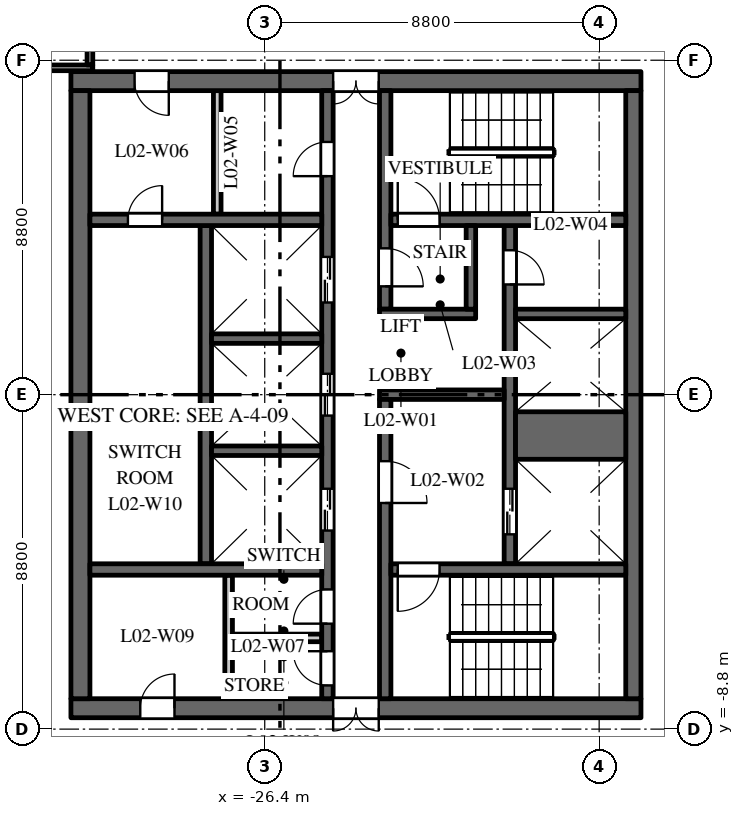
"""IFC4 building model, lengths in metres.
Left out: names, types, materials, properties, quantities, classifications, styles, units other than length and angle.
Written with IfcOpenShell. Run it as: python <this file> out.ifc"""

import sys

from ifc_helpers import new_model, si_unit, direction, frame, frame_2d, origin, place, context, subcontext, project, spatial, rectangle, extrude, element, fill, save


model = new_model("IFC4")
c1 = context("Model", 3, precision=1e-05, world=origin(), true_north=direction((0.0, 1.0)))
c2 = subcontext(c1, "Body", "Model", "MODEL_VIEW")
j1 = project(units=[si_unit("LENGTHUNIT", "METRE"), si_unit("PLANEANGLEUNIT", "RADIAN")], contexts=[c1])
p1 = place(None, origin())
s1 = spatial("IfcSite", under=j1, at=p1, CompositionType="ELEMENT")
p2 = place(p1, origin())
s2 = spatial("IfcBuilding", under=s1, at=p2, CompositionType="ELEMENT")
p3 = place(p2, frame((0.0, 0.0, 13.5)))
s3 = spatial("IfcBuildingStorey", under=s2, at=p3, CompositionType="ELEMENT", Elevation=13.5)
p4 = place(p3, frame((-16.5, 8.25, 0.0), z_axis=(0.0, 0.0, 1.0), x_axis=(-1.0, 0.0, 0.0)))
e1 = element("IfcWall", 1, at=p4, inside=s3, PredefinedType="SHEAR", context=c2, shape_type="SweptSolid", body=[
    extrude(rectangle(XDim=15.0, YDim=0.5, at=frame_2d((7.5, 0.0))), origin(), (0.0, 0.0, 1.0), 5.75),
])
p5 = place(p4, frame((6.9, 0.0, 0.0)))
e2 = element("IfcOpeningElement", 2, at=p5, cuts=e1, PredefinedType="OPENING", context=c2, shape_type="SweptSolid", body=[
    extrude(rectangle(XDim=1.2, YDim=2.1, at=frame_2d((0.6, 1.05))), frame((0.0, 0.26, 0.0), z_axis=(0.0, -1.0, 0.0), x_axis=(1.0, 0.0, 0.0)), (0.0, 0.0, 1.0), 0.52),
])
p6 = place(p4, frame((12.425, 0.0, 0.0)))
e3 = element("IfcOpeningElement", 3, at=p6, cuts=e1, PredefinedType="OPENING", context=c2, shape_type="SweptSolid", body=[
    extrude(rectangle(XDim=0.9, YDim=2.1, at=frame_2d((0.45, 1.05))), frame((0.0, 0.26, 0.0), z_axis=(0.0, -1.0, 0.0), x_axis=(1.0, 0.0, 0.0)), (0.0, 0.0, 1.0), 0.52),
])
p7 = place(p3, frame((-16.5, -8.25, 0.0), z_axis=(0.0, 0.0, 1.0), x_axis=(-1.0, 0.0, 0.0)))
e4 = element("IfcWall", 4, at=p7, inside=s3, PredefinedType="SHEAR", context=c2, shape_type="SweptSolid", body=[
    extrude(rectangle(XDim=15.0, YDim=0.5, at=frame_2d((7.5, 0.0))), origin(), (0.0, 0.0, 1.0), 5.75),
])
p8 = place(p7, frame((6.9, 0.0, 0.0)))
e5 = element("IfcOpeningElement", 5, at=p8, cuts=e4, PredefinedType="OPENING", context=c2, shape_type="SweptSolid", body=[
    extrude(rectangle(XDim=1.2, YDim=2.1, at=frame_2d((0.6, 1.05))), frame((0.0, 0.26, 0.0), z_axis=(0.0, -1.0, 0.0), x_axis=(1.0, 0.0, 0.0)), (0.0, 0.0, 1.0), 0.52),
])
p9 = place(p7, frame((12.275, 0.0, 0.0)))
e6 = element("IfcOpeningElement", 6, at=p9, cuts=e4, PredefinedType="OPENING", context=c2, shape_type="SweptSolid", body=[
    extrude(rectangle(XDim=0.9, YDim=2.1, at=frame_2d((0.45, 1.05))), frame((0.0, 0.26, 0.0), z_axis=(0.0, -1.0, 0.0), x_axis=(1.0, 0.0, 0.0)), (0.0, 0.0, 1.0), 0.52),
])
p10 = place(p3, frame((-27.95, -4.45, 0.0), z_axis=(0.0, 0.0, 1.0), x_axis=(0.0, 1.0, 0.0)))
e7 = element("IfcWall", 7, at=p10, inside=s3, PredefinedType="SHEAR", context=c2, shape_type="SweptSolid", body=[
    extrude(rectangle(XDim=8.9, YDim=0.3, at=frame_2d((4.45, 0.0))), origin(), (0.0, 0.0, 1.0), 5.75),
])
p11 = place(p3, frame((-19.95, -4.45, 0.0), z_axis=(0.0, 0.0, 1.0), x_axis=(0.0, 1.0, 0.0)))
e8 = element("IfcWall", 8, at=p11, inside=s3, PredefinedType="SHEAR", context=c2, shape_type="SweptSolid", body=[
    extrude(rectangle(XDim=8.9, YDim=0.3, at=frame_2d((4.45, 0.0))), origin(), (0.0, 0.0, 1.0), 5.75),
])
p12 = place(p11, frame((0.775, 0.0, 0.0)))
e9 = element("IfcOpeningElement", 9, at=p12, cuts=e8, PredefinedType="OPENING", context=c2, shape_type="SweptSolid", body=[
    extrude(rectangle(XDim=1.2, YDim=2.1, at=frame_2d((0.6, 1.05))), frame((0.0, 0.16, 0.0), z_axis=(0.0, -1.0, 0.0), x_axis=(1.0, 0.0, 0.0)), (0.0, 0.0, 1.0), 0.32),
])
p13 = place(p11, frame((7.35, 0.0, 0.0)))
e10 = element("IfcOpeningElement", 10, at=p13, cuts=e8, PredefinedType="OPENING", context=c2, shape_type="SweptSolid", body=[
    extrude(rectangle(XDim=0.9, YDim=2.1, at=frame_2d((0.45, 1.05))), frame((0.0, 0.16, 0.0), z_axis=(0.0, -1.0, 0.0), x_axis=(1.0, 0.0, 0.0)), (0.0, 0.0, 1.0), 0.32),
])
p14 = place(p3, frame((-24.75, -8.0, 0.0), z_axis=(0.0, 0.0, 1.0), x_axis=(0.0, 1.0, 0.0)))
e11 = element("IfcWall", 11, at=p14, inside=s3, PredefinedType="SHEAR", context=c2, shape_type="SweptSolid", body=[
    extrude(rectangle(XDim=16.0, YDim=0.3, at=frame_2d((8.0, 0.0))), origin(), (0.0, 0.0, 1.0), 5.75),
])
p15 = place(p14, frame((4.425, 0.0, 0.0)))
e12 = element("IfcOpeningElement", 12, at=p15, cuts=e11, PredefinedType="OPENING", context=c2, shape_type="SweptSolid", body=[
    extrude(rectangle(XDim=1.1, YDim=2.1, at=frame_2d((0.55, 1.05))), frame((0.0, 0.16, 0.0), z_axis=(0.0, -1.0, 0.0), x_axis=(1.0, 0.0, 0.0)), (0.0, 0.0, 1.0), 0.32),
])
p16 = place(p14, frame((7.45, 0.0, 0.0)))
e13 = element("IfcOpeningElement", 13, at=p16, cuts=e11, PredefinedType="OPENING", context=c2, shape_type="SweptSolid", body=[
    extrude(rectangle(XDim=1.1, YDim=2.1, at=frame_2d((0.55, 1.05))), frame((0.0, 0.16, 0.0), z_axis=(0.0, -1.0, 0.0), x_axis=(1.0, 0.0, 0.0)), (0.0, 0.0, 1.0), 0.32),
])
p17 = place(p14, frame((10.425, 0.0, 0.0)))
e14 = element("IfcOpeningElement", 14, at=p17, cuts=e11, PredefinedType="OPENING", context=c2, shape_type="SweptSolid", body=[
    extrude(rectangle(XDim=1.2, YDim=2.1, at=frame_2d((0.6, 1.05))), frame((0.0, 0.16, 0.0), z_axis=(0.0, -1.0, 0.0), x_axis=(1.0, 0.0, 0.0)), (0.0, 0.0, 1.0), 0.32),
])
p18 = place(p14, frame((13.75, 0.0, 0.0)))
e15 = element("IfcOpeningElement", 15, at=p18, cuts=e11, PredefinedType="OPENING", context=c2, shape_type="SweptSolid", body=[
    extrude(rectangle(XDim=0.9, YDim=2.1, at=frame_2d((0.45, 1.05))), frame((0.0, 0.16, 0.0), z_axis=(0.0, -1.0, 0.0), x_axis=(1.0, 0.0, 0.0)), (0.0, 0.0, 1.0), 0.32),
])
p19 = place(p14, frame((1.975, 0.0, 0.0)))
e16 = element("IfcOpeningElement", 16, at=p19, cuts=e11, PredefinedType="OPENING", context=c2, shape_type="SweptSolid", body=[
    extrude(rectangle(XDim=0.9, YDim=2.1, at=frame_2d((0.45, 1.05))), frame((0.0, 0.16, 0.0), z_axis=(0.0, -1.0, 0.0), x_axis=(1.0, 0.0, 0.0)), (0.0, 0.0, 1.0), 0.32),
])
p20 = place(p14, frame((0.35, 0.0, 0.0)))
e17 = element("IfcOpeningElement", 17, at=p20, cuts=e11, PredefinedType="OPENING", context=c2, shape_type="SweptSolid", body=[
    extrude(rectangle(XDim=0.9, YDim=2.1, at=frame_2d((0.45, 1.05))), frame((0.0, 0.16, 0.0), z_axis=(0.0, -1.0, 0.0), x_axis=(1.0, 0.0, 0.0)), (0.0, 0.0, 1.0), 0.32),
])
p21 = place(p3, frame((-20.1, 0.0, 0.0), z_axis=(0.0, 0.0, 1.0), x_axis=(-1.0, 0.0, 0.0)))
e18 = element("IfcWall", 18, at=p21, inside=s3, PredefinedType="SHEAR", context=c2, shape_type="SweptSolid", body=[
    extrude(rectangle(XDim=3.28, YDim=0.25, at=frame_2d((1.64, 0.0))), origin(), (0.0, 0.0, 1.0), 5.75),
])
p22 = place(p3, frame((-16.7, -8.0, 0.0), z_axis=(0.0, 0.0, 1.0), x_axis=(0.0, 1.0, 0.0)))
e19 = element("IfcWall", 19, at=p22, inside=s3, PredefinedType="SHEAR", context=c2, shape_type="SweptSolid", body=[
    extrude(rectangle(XDim=16.0, YDim=0.4, at=frame_2d((8.0, 0.0))), origin(), (0.0, 0.0, 1.0), 5.75),
])
p23 = place(p3, frame((-31.25, -8.0, 0.0), z_axis=(0.0, 0.0, 1.0), x_axis=(0.0, 1.0, 0.0)))
e20 = element("IfcWall", 20, at=p23, inside=s3, PredefinedType="SHEAR", context=c2, shape_type="SweptSolid", body=[
    extrude(rectangle(XDim=16.0, YDim=0.5, at=frame_2d((8.0, 0.0))), origin(), (0.0, 0.0, 1.0), 5.75),
])
p24 = place(p3, frame((-24.9, 4.6, 0.0), z_axis=(0.0, 0.0, 1.0), x_axis=(-1.0, 0.0, 0.0)))
e21 = element("IfcWall", 21, at=p24, inside=s3, PredefinedType="SHEAR", context=c2, shape_type="SweptSolid", body=[
    extrude(rectangle(XDim=6.1, YDim=0.3, at=frame_2d((3.05, 0.0))), origin(), (0.0, 0.0, 1.0), 5.75),
])
p25 = place(p24, frame((4.2, 0.0, 0.0)))
e22 = element("IfcOpeningElement", 22, at=p25, cuts=e21, PredefinedType="OPENING", context=c2, shape_type="SweptSolid", body=[
    extrude(rectangle(XDim=0.9, YDim=2.1, at=frame_2d((0.45, 1.05))), frame((0.0, 0.16, 0.0), z_axis=(0.0, -1.0, 0.0), x_axis=(1.0, 0.0, 0.0)), (0.0, 0.0, 1.0), 0.32),
])
for number, where, z_axis, x_axis in (
    (23, (-27.65, 4.75, 0.0), (0.0, 0.0, 1.0), (0.0, 1.0, 0.0)),
    (24, (-27.35, -8.0, 0.0), (0.0, 0.0, 1.0), (0.0, 1.0, 0.0)),
):
    element("IfcWall", number, at=place(p3, frame(where, z_axis=z_axis, x_axis=x_axis)), inside=s3, PredefinedType="PARTITIONING", context=c2, shape_type="SweptSolid", body=[
        extrude(rectangle(XDim=3.25, YDim=0.2, at=frame_2d((1.625, 0.0))), origin(), (0.0, 0.0, 1.0), 5.75),
    ])
p26 = place(p3, frame((-24.9, -6.4, 0.0), z_axis=(0.0, 0.0, 1.0), x_axis=(-1.0, 0.0, 0.0)))
e25 = element("IfcWall", 25, at=p26, inside=s3, PredefinedType="PARTITIONING", context=c2, shape_type="SweptSolid", body=[
    extrude(rectangle(XDim=2.35, YDim=0.2, at=frame_2d((1.175, 0.0))), origin(), (0.0, 0.0, 1.0), 5.75),
])
p27 = place(p3, frame((-24.9, -4.6, 0.0), z_axis=(0.0, 0.0, 1.0), x_axis=(-1.0, 0.0, 0.0)))
e26 = element("IfcWall", 26, at=p27, inside=s3, PredefinedType="SHEAR", context=c2, shape_type="SweptSolid", body=[
    extrude(rectangle(XDim=6.1, YDim=0.3, at=frame_2d((3.05, 0.0))), origin(), (0.0, 0.0, 1.0), 5.75),
])
p28 = place(p3, frame((-16.9, -1.075, 0.0), z_axis=(0.0, 0.0, 1.0), x_axis=(-1.0, 0.0, 0.0)))
e27 = element("IfcWall", 27, at=p28, inside=s3, PredefinedType="SHEAR", context=c2, shape_type="SweptSolid", body=[
    extrude(rectangle(XDim=2.9, YDim=1.25, at=frame_2d((1.45, 0.0))), origin(), (0.0, 0.0, 1.0), 5.75),
])
for number, where, z_axis, x_axis in (
    (28, (-16.9, 2.125, 0.0), (0.0, 0.0, 1.0), (-1.0, 0.0, 0.0)),
    (29, (-24.9, -1.475, 0.0), (0.0, 0.0, 1.0), (-1.0, 0.0, 0.0)),
    (30, (-24.9, 1.475, 0.0), (0.0, 0.0, 1.0), (-1.0, 0.0, 0.0)),
):
    element("IfcWall", number, at=place(p3, frame(where, z_axis=z_axis, x_axis=x_axis)), inside=s3, PredefinedType="SHEAR", context=c2, shape_type="SweptSolid", body=[
        extrude(rectangle(XDim=2.9, YDim=0.25, at=frame_2d((1.45, 0.0))), origin(), (0.0, 0.0, 1.0), 5.75),
    ])
p29 = place(p3, frame((-23.23, 2.25, 0.0), z_axis=(0.0, 0.0, 1.0), x_axis=(0.0, 1.0, 0.0)))
e31 = element("IfcWall", 31, at=p29, inside=s3, PredefinedType="SHEAR", context=c2, shape_type="SweptSolid", body=[
    extrude(rectangle(XDim=5.75, YDim=0.3, at=frame_2d((2.875, 0.0))), origin(), (0.0, 0.0, 1.0), 5.75),
])
p30 = place(p29, frame((0.6, 0.0, 0.0)))
e32 = element("IfcOpeningElement", 32, at=p30, cuts=e31, PredefinedType="OPENING", context=c2, shape_type="SweptSolid", body=[
    extrude(rectangle(XDim=1.0, YDim=2.1, at=frame_2d((0.5, 1.05))), frame((0.0, 0.16, 0.0), z_axis=(0.0, -1.0, 0.0), x_axis=(1.0, 0.0, 0.0)), (0.0, 0.0, 1.0), 0.32),
])
p31 = place(p3, frame((-23.23, -8.0, 0.0), z_axis=(0.0, 0.0, 1.0), x_axis=(0.0, 1.0, 0.0)))
e33 = element("IfcWall", 33, at=p31, inside=s3, PredefinedType="SHEAR", context=c2, shape_type="SweptSolid", body=[
    extrude(rectangle(XDim=7.875, YDim=0.3, at=frame_2d((3.938, 0.0))), origin(), (0.0, 0.0, 1.0), 5.75),
])
p32 = place(p31, frame((5.15, 0.0, 0.0)))
e34 = element("IfcOpeningElement", 34, at=p32, cuts=e33, PredefinedType="OPENING", context=c2, shape_type="SweptSolid", body=[
    extrude(rectangle(XDim=1.1, YDim=2.1, at=frame_2d((0.55, 1.05))), frame((0.0, 0.16, 0.0), z_axis=(0.0, -1.0, 0.0), x_axis=(1.0, 0.0, 0.0)), (0.0, 0.0, 1.0), 0.32),
])
p33 = place(p3, frame((-16.9, 4.6, 0.0), z_axis=(0.0, 0.0, 1.0), x_axis=(-1.0, 0.0, 0.0)))
e35 = element("IfcWall", 35, at=p33, inside=s3, PredefinedType="SHEAR", context=c2, shape_type="SweptSolid", body=[
    extrude(rectangle(XDim=6.18, YDim=0.3, at=frame_2d((3.09, 0.0))), origin(), (0.0, 0.0, 1.0), 5.75),
])
p34 = place(p33, frame((4.9, 0.0, 0.0)))
e36 = element("IfcOpeningElement", 36, at=p34, cuts=e35, PredefinedType="OPENING", context=c2, shape_type="SweptSolid", body=[
    extrude(rectangle(XDim=1.1, YDim=2.1, at=frame_2d((0.55, 1.05))), frame((0.0, 0.16, 0.0), z_axis=(0.0, -1.0, 0.0), x_axis=(1.0, 0.0, 0.0)), (0.0, 0.0, 1.0), 0.32),
])
p35 = place(p3, frame((-16.9, -4.6, 0.0), z_axis=(0.0, 0.0, 1.0), x_axis=(-1.0, 0.0, 0.0)))
e37 = element("IfcWall", 37, at=p35, inside=s3, PredefinedType="SHEAR", context=c2, shape_type="SweptSolid", body=[
    extrude(rectangle(XDim=6.18, YDim=0.3, at=frame_2d((3.09, 0.0))), origin(), (0.0, 0.0, 1.0), 5.75),
])
p36 = place(p35, frame((4.9, 0.0, 0.0)))
e38 = element("IfcOpeningElement", 38, at=p36, cuts=e37, PredefinedType="OPENING", context=c2, shape_type="SweptSolid", body=[
    extrude(rectangle(XDim=1.1, YDim=2.1, at=frame_2d((0.55, 1.05))), frame((0.0, 0.16, 0.0), z_axis=(0.0, -1.0, 0.0), x_axis=(1.0, 0.0, 0.0)), (0.0, 0.0, 1.0), 0.32),
])
p37 = place(p3, frame((-20.85, 2.125, 0.0), z_axis=(0.0, 0.0, 1.0), x_axis=(-1.0, 0.0, 0.0)))
e39 = element("IfcWall", 39, at=p37, inside=s3, PredefinedType="SHEAR", context=c2, shape_type="SweptSolid", body=[
    extrude(rectangle(XDim=2.53, YDim=0.25, at=frame_2d((1.265, 0.0))), origin(), (0.0, 0.0, 1.0), 5.75),
])
p38 = place(p3, frame((-20.975, 2.25, 0.0), z_axis=(0.0, 0.0, 1.0), x_axis=(0.0, 1.0, 0.0)))
e40 = element("IfcWall", 40, at=p38, inside=s3, PredefinedType="SHEAR", context=c2, shape_type="SweptSolid", body=[
    extrude(rectangle(XDim=2.2, YDim=0.25, at=frame_2d((1.1, 0.0))), origin(), (0.0, 0.0, 1.0), 5.75),
])
p39 = place(p3, frame((-30.925, 8.6, 0.0), z_axis=(0.0, 0.0, 1.0), x_axis=(-1.0, 0.0, 0.0)))
e41 = element("IfcWall", 41, at=p39, inside=s3, PredefinedType="PARTITIONING", context=c2, shape_type="SweptSolid", body=[
    extrude(rectangle(XDim=8.025, YDim=0.15, at=frame_2d((4.012, 0.0))), origin(), (0.0, 0.0, 1.0), 4.85),
])
p40 = place(p39, frame((4.012, 0.0, 0.0)))
e42 = element("IfcOpeningElement", 42, at=p40, cuts=e41, PredefinedType="OPENING", context=c2, shape_type="SweptSolid", body=[
    extrude(rectangle(XDim=1.0, YDim=2.1, at=frame_2d((0.5, 1.05))), frame((0.0, 0.085, 0.0), z_axis=(0.0, -1.0, 0.0), x_axis=(1.0, 0.0, 0.0)), (0.0, 0.0, 1.0), 0.17),
])
p41 = place(p3, frame((-31.0, 11.925, 0.0), z_axis=(0.0, 0.0, 1.0), x_axis=(0.0, -1.0, 0.0)))
e43 = element("IfcWall", 43, at=p41, inside=s3, PredefinedType="PARTITIONING", context=c2, shape_type="SweptSolid", body=[
    extrude(rectangle(XDim=3.25, YDim=0.15, at=frame_2d((1.625, 0.0))), origin(), (0.0, 0.0, 1.0), 5.75),
])
p42 = place(p12, origin())
e44 = element("IfcDoor", 44, at=p42, inside=s3, OperationType="DOUBLE_DOOR_SLIDING", PredefinedType="DOOR", context=c2, shape_type="SweptSolid", body=[
    extrude(rectangle(XDim=1.2, YDim=2.1, at=frame_2d((0.6, 1.05))), frame((0.0, 0.025, 0.0), z_axis=(0.0, -1.0, 0.0), x_axis=(1.0, 0.0, 0.0)), (0.0, 0.0, 1.0), 0.05),
])
fill(e9, e44)
p43 = place(p15, origin())
e45 = element("IfcDoor", 45, at=p43, inside=s3, OperationType="DOUBLE_DOOR_SLIDING", PredefinedType="DOOR", context=c2, shape_type="SweptSolid", body=[
    extrude(rectangle(XDim=1.1, YDim=2.1, at=frame_2d((0.55, 1.05))), frame((0.0, 0.025, 0.0), z_axis=(0.0, -1.0, 0.0), x_axis=(1.0, 0.0, 0.0)), (0.0, 0.0, 1.0), 0.05),
])
fill(e12, e45)
p44 = place(p16, origin())
e46 = element("IfcDoor", 46, at=p44, inside=s3, OperationType="DOUBLE_DOOR_SLIDING", PredefinedType="DOOR", context=c2, shape_type="SweptSolid", body=[
    extrude(rectangle(XDim=1.1, YDim=2.1, at=frame_2d((0.55, 1.05))), frame((0.0, 0.025, 0.0), z_axis=(0.0, -1.0, 0.0), x_axis=(1.0, 0.0, 0.0)), (0.0, 0.0, 1.0), 0.05),
])
fill(e13, e46)
p45 = place(p17, origin())
e47 = element("IfcDoor", 47, at=p45, inside=s3, OperationType="DOUBLE_DOOR_SLIDING", PredefinedType="DOOR", context=c2, shape_type="SweptSolid", body=[
    extrude(rectangle(XDim=1.2, YDim=2.1, at=frame_2d((0.6, 1.05))), frame((0.0, 0.025, 0.0), z_axis=(0.0, -1.0, 0.0), x_axis=(1.0, 0.0, 0.0)), (0.0, 0.0, 1.0), 0.05),
])
fill(e14, e47)
p46 = place(p34, origin())
e48 = element("IfcDoor", 48, at=p46, inside=s3, OperationType="SINGLE_SWING_RIGHT", PredefinedType="DOOR", context=c2, shape_type="SweptSolid", body=[
    extrude(rectangle(XDim=1.1, YDim=2.1, at=frame_2d((0.55, 1.05))), frame((0.0, 0.025, 0.0), z_axis=(0.0, -1.0, 0.0), x_axis=(1.0, 0.0, 0.0)), (0.0, 0.0, 1.0), 0.05),
])
fill(e36, e48)
p47 = place(p36, origin())
e49 = element("IfcDoor", 49, at=p47, inside=s3, OperationType="SINGLE_SWING_LEFT", PredefinedType="DOOR", context=c2, shape_type="SweptSolid", body=[
    extrude(rectangle(XDim=1.1, YDim=2.1, at=frame_2d((0.55, 1.05))), frame((0.0, 0.025, 0.0), z_axis=(0.0, -1.0, 0.0), x_axis=(1.0, 0.0, 0.0)), (0.0, 0.0, 1.0), 0.05),
])
fill(e38, e49)
p48 = place(p32, origin())
e50 = element("IfcDoor", 50, at=p48, inside=s3, OperationType="SINGLE_SWING_LEFT", PredefinedType="DOOR", context=c2, shape_type="SweptSolid", body=[
    extrude(rectangle(XDim=1.1, YDim=2.1, at=frame_2d((0.55, 1.05))), frame((0.0, 0.025, 0.0), z_axis=(0.0, -1.0, 0.0), x_axis=(1.0, 0.0, 0.0)), (0.0, 0.0, 1.0), 0.05),
])
fill(e34, e50)
p49 = place(p30, origin())
e51 = element("IfcDoor", 51, at=p49, inside=s3, OperationType="SINGLE_SWING_LEFT", PredefinedType="DOOR", context=c2, shape_type="SweptSolid", body=[
    extrude(rectangle(XDim=1.0, YDim=2.1, at=frame_2d((0.5, 1.05))), frame((0.0, 0.025, 0.0), z_axis=(0.0, -1.0, 0.0), x_axis=(1.0, 0.0, 0.0)), (0.0, 0.0, 1.0), 0.05),
])
fill(e32, e51)
p50 = place(p5, origin())
e52 = element("IfcDoor", 52, at=p50, inside=s3, OperationType="DOUBLE_DOOR_DOUBLE_SWING", PredefinedType="DOOR", context=c2, shape_type="SweptSolid", body=[
    extrude(rectangle(XDim=1.2, YDim=2.1, at=frame_2d((0.6, 1.05))), frame((0.0, 0.025, 0.0), z_axis=(0.0, -1.0, 0.0), x_axis=(1.0, 0.0, 0.0)), (0.0, 0.0, 1.0), 0.05),
])
fill(e2, e52)
p51 = place(p8, origin())
e53 = element("IfcDoor", 53, at=p51, inside=s3, OperationType="DOUBLE_DOOR_DOUBLE_SWING", PredefinedType="DOOR", context=c2, shape_type="SweptSolid", body=[
    extrude(rectangle(XDim=1.2, YDim=2.1, at=frame_2d((0.6, 1.05))), frame((0.0, 0.025, 0.0), z_axis=(0.0, -1.0, 0.0), x_axis=(1.0, 0.0, 0.0)), (0.0, 0.0, 1.0), 0.05),
])
fill(e5, e53)
p52 = place(p13, origin())
e54 = element("IfcDoor", 54, at=p52, inside=s3, OperationType="SINGLE_SWING_LEFT", PredefinedType="DOOR", context=c2, shape_type="SweptSolid", body=[
    extrude(rectangle(XDim=0.9, YDim=2.1, at=frame_2d((0.45, 1.05))), frame((0.0, 0.025, 0.0), z_axis=(0.0, -1.0, 0.0), x_axis=(1.0, 0.0, 0.0)), (0.0, 0.0, 1.0), 0.05),
])
fill(e10, e54)
p53 = place(p18, origin())
e55 = element("IfcDoor", 55, at=p53, inside=s3, OperationType="SINGLE_SWING_RIGHT", PredefinedType="DOOR", context=c2, shape_type="SweptSolid", body=[
    extrude(rectangle(XDim=0.9, YDim=2.1, at=frame_2d((0.45, 1.05))), frame((0.0, 0.025, 0.0), z_axis=(0.0, -1.0, 0.0), x_axis=(1.0, 0.0, 0.0)), (0.0, 0.0, 1.0), 0.05),
])
fill(e15, e55)
p54 = place(p6, origin())
e56 = element("IfcDoor", 56, at=p54, inside=s3, OperationType="SINGLE_SWING_RIGHT", PredefinedType="DOOR", context=c2, shape_type="SweptSolid", body=[
    extrude(rectangle(XDim=0.9, YDim=2.1, at=frame_2d((0.45, 1.05))), frame((0.0, 0.025, 0.0), z_axis=(0.0, -1.0, 0.0), x_axis=(1.0, 0.0, 0.0)), (0.0, 0.0, 1.0), 0.05),
])
fill(e3, e56)
p55 = place(p19, origin())
e57 = element("IfcDoor", 57, at=p55, inside=s3, OperationType="SINGLE_SWING_RIGHT", PredefinedType="DOOR", context=c2, shape_type="SweptSolid", body=[
    extrude(rectangle(XDim=0.9, YDim=2.1, at=frame_2d((0.45, 1.05))), frame((0.0, 0.025, 0.0), z_axis=(0.0, -1.0, 0.0), x_axis=(1.0, 0.0, 0.0)), (0.0, 0.0, 1.0), 0.05),
])
fill(e16, e57)
p56 = place(p20, origin())
e58 = element("IfcDoor", 58, at=p56, inside=s3, OperationType="SINGLE_SWING_LEFT", PredefinedType="DOOR", context=c2, shape_type="SweptSolid", body=[
    extrude(rectangle(XDim=0.9, YDim=2.1, at=frame_2d((0.45, 1.05))), frame((0.0, 0.025, 0.0), z_axis=(0.0, -1.0, 0.0), x_axis=(1.0, 0.0, 0.0)), (0.0, 0.0, 1.0), 0.05),
])
fill(e17, e58)
p57 = place(p9, origin())
e59 = element("IfcDoor", 59, at=p57, inside=s3, OperationType="SINGLE_SWING_LEFT", PredefinedType="DOOR", context=c2, shape_type="SweptSolid", body=[
    extrude(rectangle(XDim=0.9, YDim=2.1, at=frame_2d((0.45, 1.05))), frame((0.0, 0.025, 0.0), z_axis=(0.0, -1.0, 0.0), x_axis=(1.0, 0.0, 0.0)), (0.0, 0.0, 1.0), 0.05),
])
fill(e6, e59)
p58 = place(p25, origin())
e60 = element("IfcDoor", 60, at=p58, inside=s3, OperationType="SINGLE_SWING_LEFT", PredefinedType="DOOR", context=c2, shape_type="SweptSolid", body=[
    extrude(rectangle(XDim=0.9, YDim=2.1, at=frame_2d((0.45, 1.05))), frame((0.0, 0.025, 0.0), z_axis=(0.0, -1.0, 0.0), x_axis=(1.0, 0.0, 0.0)), (0.0, 0.0, 1.0), 0.05),
])
fill(e22, e60)
save(model, sys.argv[1])
